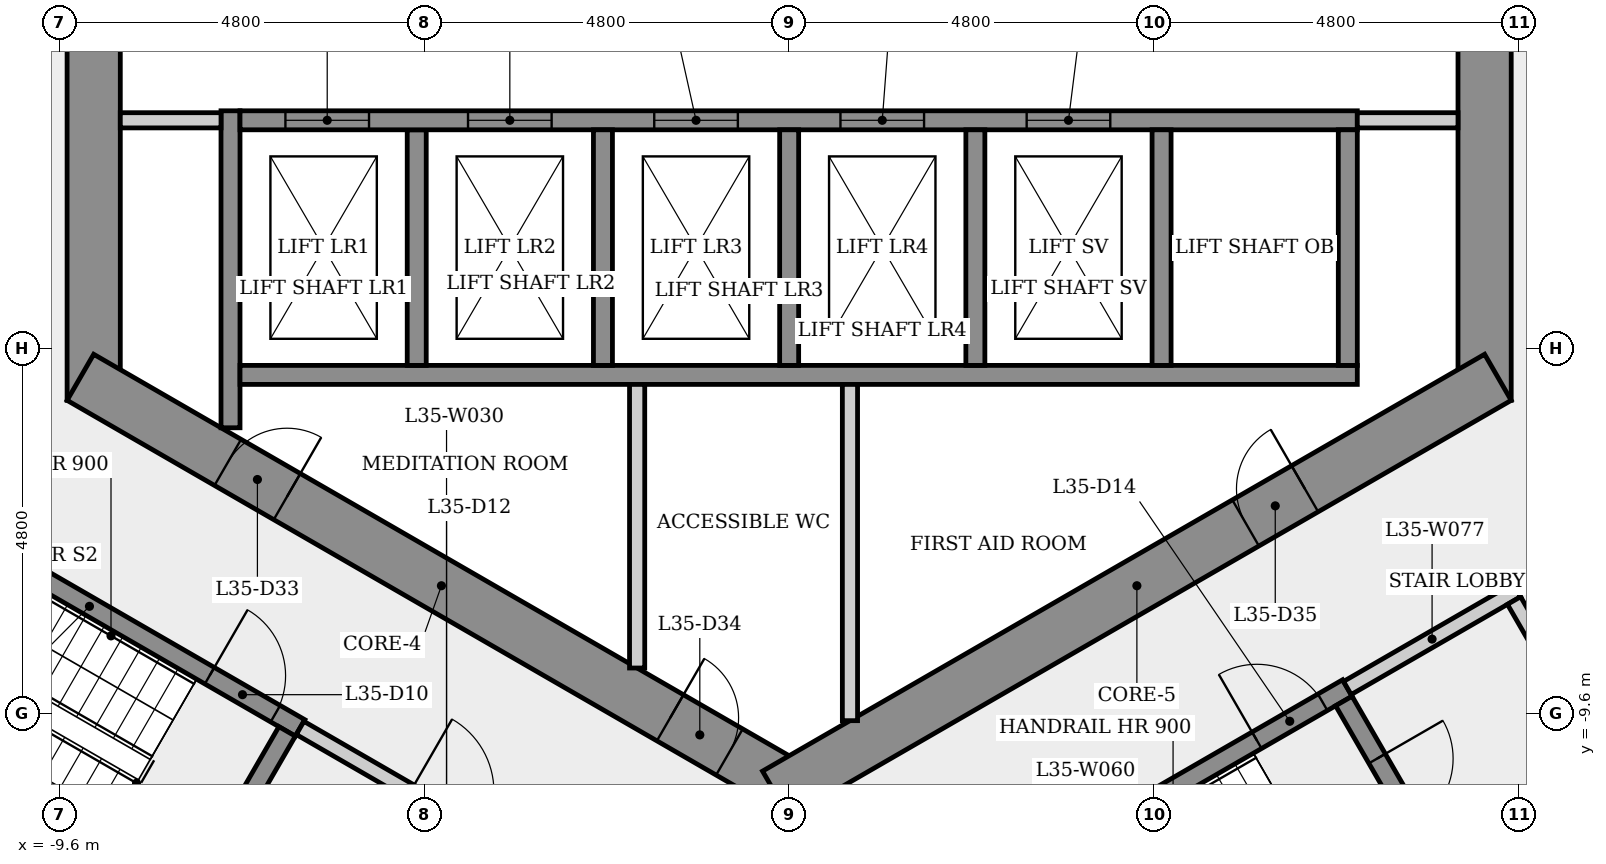
"""IFC4 building model, lengths in metres.
Left out: names, types, materials, properties, quantities, classifications, styles, units other than length and angle.
Written with IfcOpenShell. Run it as: python <this file> out.ifc"""

import sys

from ifc_helpers import new_model, si_unit, direction, frame, frame_2d, origin, place, context, subcontext, project, spatial, rectangle, extrude, element, fill, save


model = new_model("IFC4")
c1 = context("Model", 3, precision=1e-05, world=origin(), true_north=direction((0.0, 1.0)))
c2 = subcontext(c1, "Body", "Model", "MODEL_VIEW")
j1 = project(units=[si_unit("LENGTHUNIT", "METRE"), si_unit("PLANEANGLEUNIT", "RADIAN")], contexts=[c1])
p1 = place(None, origin())
s1 = spatial("IfcSite", under=j1, at=p1, CompositionType="ELEMENT")
p2 = place(p1, origin())
s2 = spatial("IfcBuilding", under=s1, at=p2, CompositionType="ELEMENT")
p3 = place(p2, frame((0.0, 0.0, 132.5)))
s3 = spatial("IfcBuildingStorey", under=s2, at=p3, CompositionType="ELEMENT", Elevation=132.5)
p4 = place(p3, frame((9.15, -5.485, 0.0), z_axis=(0.0, 0.0, 1.0), x_axis=(0.0, 1.0, 0.0)))
e1 = element("IfcWall", 1, at=p4, inside=s3, PredefinedType="SHEAR", context=c2, shape_type="SweptSolid", body=[
    extrude(rectangle(XDim=10.97, YDim=0.7, at=frame_2d((5.485, 0.0))), origin(), (0.0, 0.0, 1.0), 3.4),
])
p5 = place(p4, frame((4.685, 0.0, 0.0)))
e2 = element("IfcOpeningElement", 2, at=p5, cuts=e1, PredefinedType="OPENING", context=c2, shape_type="SweptSolid", body=[
    extrude(rectangle(XDim=1.6, YDim=2.1, at=frame_2d((0.8, 1.05))), frame((0.0, 0.36, 0.0), z_axis=(0.0, -1.0, 0.0), x_axis=(1.0, 0.0, 0.0)), (0.0, 0.0, 1.0), 0.72),
])
p6 = place(p3, frame((-9.15, 5.485, 0.0), z_axis=(0.0, 0.0, 1.0), x_axis=(0.0, -1.0, 0.0)))
e3 = element("IfcWall", 3, at=p6, inside=s3, PredefinedType="SHEAR", context=c2, shape_type="SweptSolid", body=[
    extrude(rectangle(XDim=10.97, YDim=0.7, at=frame_2d((5.485, 0.0))), origin(), (0.0, 0.0, 1.0), 3.4),
])
p7 = place(p6, frame((4.685, 0.0, 0.0)))
e4 = element("IfcOpeningElement", 4, at=p7, cuts=e3, PredefinedType="OPENING", context=c2, shape_type="SweptSolid", body=[
    extrude(rectangle(XDim=1.6, YDim=2.1, at=frame_2d((0.8, 1.05))), frame((0.0, 0.36, 0.0), z_axis=(0.0, -1.0, 0.0), x_axis=(1.0, 0.0, 0.0)), (0.0, 0.0, 1.0), 0.72),
])
p8 = place(p3, frame((-9.325, -5.182, 0.0), z_axis=(0.0, 0.0, 1.0), x_axis=(0.866023993627, -0.500002442456, 0.0)))
e5 = element("IfcWall", 5, at=p8, inside=s3, PredefinedType="SHEAR", context=c2, shape_type="SweptSolid", body=[
    extrude(rectangle(XDim=10.97, YDim=0.7, at=frame_2d((5.485, 0.0))), origin(), (0.0, 0.0, 1.0), 3.4),
])
p9 = place(p8, frame((2.239, 0.0, 0.0)))
e6 = element("IfcOpeningElement", 6, at=p9, cuts=e5, PredefinedType="OPENING", context=c2, shape_type="SweptSolid", body=[
    extrude(rectangle(XDim=0.9, YDim=2.1, at=frame_2d((0.45, 1.05))), frame((0.0, 0.36, 0.0), z_axis=(0.0, -1.0, 0.0), x_axis=(1.0, 0.0, 0.0)), (0.0, 0.0, 1.0), 0.72),
])
p10 = place(p8, frame((8.96, 0.0, 0.0)))
e7 = element("IfcOpeningElement", 7, at=p10, cuts=e5, PredefinedType="OPENING", context=c2, shape_type="SweptSolid", body=[
    extrude(rectangle(XDim=0.9, YDim=2.1, at=frame_2d((0.45, 1.05))), frame((0.0, 0.36, 0.0), z_axis=(0.0, -1.0, 0.0), x_axis=(1.0, 0.0, 0.0)), (0.0, 0.0, 1.0), 0.72),
])
p11 = place(p3, frame((-0.175, -10.667, 0.0), z_axis=(0.0, 0.0, 1.0), x_axis=(0.866023993627, 0.500002442456, 0.0)))
e8 = element("IfcWall", 8, at=p11, inside=s3, PredefinedType="SHEAR", context=c2, shape_type="SweptSolid", body=[
    extrude(rectangle(XDim=10.97, YDim=0.7, at=frame_2d((5.485, 0.0))), origin(), (0.0, 0.0, 1.0), 3.4),
])
p12 = place(p11, frame((7.137, 0.0, 0.0)))
e9 = element("IfcOpeningElement", 9, at=p12, cuts=e8, PredefinedType="OPENING", context=c2, shape_type="SweptSolid", body=[
    extrude(rectangle(XDim=0.9, YDim=2.1, at=frame_2d((0.45, 1.05))), frame((0.0, 0.36, 0.0), z_axis=(0.0, -1.0, 0.0), x_axis=(1.0, 0.0, 0.0)), (0.0, 0.0, 1.0), 0.72),
])
p13 = place(p3, frame((-11.977, -6.595, 0.0), z_axis=(0.0, 0.0, 1.0), x_axis=(0.866025499775, -0.499999833739, 0.0)))
e10 = element("IfcWall", 10, at=p13, inside=s3, PredefinedType="SHEAR", context=c2, shape_type="SweptSolid", body=[
    extrude(rectangle(XDim=6.4, YDim=0.25, at=frame_2d((3.2, 0.0))), origin(), (0.0, 0.0, 1.0), 3.0),
])
p14 = place(p13, frame((5.025, 0.0, 0.0)))
e11 = element("IfcOpeningElement", 11, at=p14, cuts=e10, PredefinedType="OPENING", context=c2, shape_type="SweptSolid", body=[
    extrude(rectangle(XDim=1.0, YDim=2.1, at=frame_2d((0.5, 1.05))), frame((0.0, 0.135, 0.0), z_axis=(0.0, -1.0, 0.0), x_axis=(1.0, 0.0, 0.0)), (0.0, 0.0, 1.0), 0.27),
])
p15 = place(p3, frame((-13.477, -9.193, 0.0), z_axis=(0.0, 0.0, 1.0), x_axis=(0.866025499775, -0.499999833739, 0.0)))
e12 = element("IfcWall", 12, at=p15, inside=s3, PredefinedType="SHEAR", context=c2, shape_type="SweptSolid", body=[
    extrude(rectangle(XDim=6.4, YDim=0.25, at=frame_2d((3.2, 0.0))), origin(), (0.0, 0.0, 1.0), 3.0),
])
p16 = place(p3, frame((-7.35, -5.846, 0.0), z_axis=(0.0, 0.0, 1.0), x_axis=(0.0, 1.0, 0.0)))
e13 = element("IfcWall", 13, at=p16, inside=s3, PredefinedType="SHEAR", context=c2, shape_type="SweptSolid", body=[
    extrude(rectangle(XDim=4.171, YDim=0.25, at=frame_2d((2.085, 0.0))), origin(), (0.0, 0.0, 1.0), 3.0),
])
p17 = place(p3, frame((-7.475, -1.8, 0.0), z_axis=(0.0, 0.0, 1.0), x_axis=(-1.0, 0.0, 0.0)))
e14 = element("IfcWall", 14, at=p17, inside=s3, PredefinedType="PARTITIONING", context=c2, shape_type="SweptSolid", body=[
    extrude(rectangle(XDim=1.325, YDim=0.2, at=frame_2d((0.663, 0.0))), origin(), (0.0, 0.0, 1.0), 3.0),
])
p18 = place(p3, frame((-6.605, -9.841, 0.0), z_axis=(0.0, 0.0, 1.0), x_axis=(-0.499996545922, -0.866027397988, 0.0)))
e15 = element("IfcWall", 15, at=p18, inside=s3, PredefinedType="SHEAR", context=c2, shape_type="SweptSolid", body=[
    extrude(rectangle(XDim=2.75, YDim=0.25, at=frame_2d((1.375, 0.0))), origin(), (0.0, 0.0, 1.0), 3.0),
])
p19 = place(p18, frame((0.875, 0.0, 0.0)))
e16 = element("IfcOpeningElement", 16, at=p19, cuts=e15, PredefinedType="OPENING", context=c2, shape_type="SweptSolid", body=[
    extrude(rectangle(XDim=1.0, YDim=2.1, at=frame_2d((0.5, 1.05))), frame((0.0, 0.135, 0.0), z_axis=(0.0, -1.0, 0.0), x_axis=(1.0, 0.0, 0.0)), (0.0, 0.0, 1.0), 0.27),
])
p20 = place(p3, frame((-6.435, -9.795, 0.0), z_axis=(0.0, 0.0, 1.0), x_axis=(0.866012907634, -0.500021643343, 0.0)))
e17 = element("IfcWall", 17, at=p20, inside=s3, PredefinedType="PARTITIONING", context=c2, shape_type="SweptSolid", body=[
    extrude(rectangle(XDim=4.45, YDim=0.2, at=frame_2d((2.225, 0.0))), origin(), (0.0, 0.0, 1.0), 3.0),
])
p21 = place(p20, frame((1.675, 0.0, 0.0)))
e18 = element("IfcOpeningElement", 18, at=p21, cuts=e17, PredefinedType="OPENING", context=c2, shape_type="SweptSolid", body=[
    extrude(rectangle(XDim=1.1, YDim=2.1, at=frame_2d((0.55, 1.05))), frame((0.0, 0.11, 0.0), z_axis=(0.0, -1.0, 0.0), x_axis=(1.0, 0.0, 0.0)), (0.0, 0.0, 1.0), 0.22),
])
p22 = place(p3, frame((-7.225, -5.15, 0.0), z_axis=(0.0, 0.0, 1.0), x_axis=(1.0, 0.0, 0.0)))
e19 = element("IfcWall", 19, at=p22, inside=s3, PredefinedType="SHEAR", context=c2, shape_type="SweptSolid", body=[
    extrude(rectangle(XDim=14.7, YDim=0.25, at=frame_2d((7.35, 0.0))), origin(), (0.0, 0.0, 1.0), 3.0),
])
p23 = place(p3, frame((-4.9, -1.925, 0.0), z_axis=(0.0, 0.0, 1.0), x_axis=(0.0, -1.0, 0.0)))
e20 = element("IfcWall", 20, at=p23, inside=s3, PredefinedType="SHEAR", context=c2, shape_type="SweptSolid", body=[
    extrude(rectangle(XDim=3.1, YDim=0.25, at=frame_2d((1.55, 0.0))), origin(), (0.0, 0.0, 1.0), 3.4),
])
p24 = place(p3, frame((-7.225, -1.8, 0.0), z_axis=(0.0, 0.0, 1.0), x_axis=(1.0, 0.0, 0.0)))
e21 = element("IfcWall", 21, at=p24, inside=s3, PredefinedType="SHEAR", context=c2, shape_type="SweptSolid", body=[
    extrude(rectangle(XDim=14.7, YDim=0.25, at=frame_2d((7.35, 0.0))), origin(), (0.0, 0.0, 1.0), 3.0),
])
p25 = place(p24, frame((0.597, 0.0, 0.0)))
e22 = element("IfcOpeningElement", 22, at=p25, cuts=e21, PredefinedType="OPENING", context=c2, shape_type="SweptSolid", body=[
    extrude(rectangle(XDim=1.1, YDim=2.1, at=frame_2d((0.55, 1.05))), frame((0.0, 0.135, 0.0), z_axis=(0.0, -1.0, 0.0), x_axis=(1.0, 0.0, 0.0)), (0.0, 0.0, 1.0), 0.27),
])
p26 = place(p24, frame((3.0, 0.0, 0.0)))
e23 = element("IfcOpeningElement", 23, at=p26, cuts=e21, PredefinedType="OPENING", context=c2, shape_type="SweptSolid", body=[
    extrude(rectangle(XDim=1.1, YDim=2.1, at=frame_2d((0.55, 1.05))), frame((0.0, 0.135, 0.0), z_axis=(0.0, -1.0, 0.0), x_axis=(1.0, 0.0, 0.0)), (0.0, 0.0, 1.0), 0.27),
])
p27 = place(p24, frame((5.45, 0.0, 0.0)))
e24 = element("IfcOpeningElement", 24, at=p27, cuts=e21, PredefinedType="OPENING", context=c2, shape_type="SweptSolid", body=[
    extrude(rectangle(XDim=1.1, YDim=2.1, at=frame_2d((0.55, 1.05))), frame((0.0, 0.135, 0.0), z_axis=(0.0, -1.0, 0.0), x_axis=(1.0, 0.0, 0.0)), (0.0, 0.0, 1.0), 0.27),
])
p28 = place(p24, frame((7.9, 0.0, 0.0)))
e25 = element("IfcOpeningElement", 25, at=p28, cuts=e21, PredefinedType="OPENING", context=c2, shape_type="SweptSolid", body=[
    extrude(rectangle(XDim=1.1, YDim=2.1, at=frame_2d((0.55, 1.05))), frame((0.0, 0.135, 0.0), z_axis=(0.0, -1.0, 0.0), x_axis=(1.0, 0.0, 0.0)), (0.0, 0.0, 1.0), 0.27),
])
p29 = place(p24, frame((10.35, 0.0, 0.0)))
e26 = element("IfcOpeningElement", 26, at=p29, cuts=e21, PredefinedType="OPENING", context=c2, shape_type="SweptSolid", body=[
    extrude(rectangle(XDim=1.1, YDim=2.1, at=frame_2d((0.55, 1.05))), frame((0.0, 0.135, 0.0), z_axis=(0.0, -1.0, 0.0), x_axis=(1.0, 0.0, 0.0)), (0.0, 0.0, 1.0), 0.27),
])
p30 = place(p3, frame((-2.45, -1.925, 0.0), z_axis=(0.0, 0.0, 1.0), x_axis=(0.0, -1.0, 0.0)))
e27 = element("IfcWall", 27, at=p30, inside=s3, PredefinedType="SHEAR", context=c2, shape_type="SweptSolid", body=[
    extrude(rectangle(XDim=3.1, YDim=0.25, at=frame_2d((1.55, 0.0))), origin(), (0.0, 0.0, 1.0), 3.4),
])
p31 = place(p3, frame((-2.0, -5.275, 0.0), z_axis=(0.0, 0.0, 1.0), x_axis=(0.0, -1.0, 0.0)))
e28 = element("IfcWall", 28, at=p31, inside=s3, PredefinedType="PARTITIONING", context=c2, shape_type="SweptSolid", body=[
    extrude(rectangle(XDim=3.732, YDim=0.2, at=frame_2d((1.866, 0.0))), origin(), (0.0, 0.0, 1.0), 3.0),
])
p32 = place(p3, frame((0.0, -1.925, 0.0), z_axis=(0.0, 0.0, 1.0), x_axis=(0.0, -1.0, 0.0)))
e29 = element("IfcWall", 29, at=p32, inside=s3, PredefinedType="SHEAR", context=c2, shape_type="SweptSolid", body=[
    extrude(rectangle(XDim=3.1, YDim=0.25, at=frame_2d((1.55, 0.0))), origin(), (0.0, 0.0, 1.0), 3.4),
])
p33 = place(p3, frame((0.8, -5.275, 0.0), z_axis=(0.0, 0.0, 1.0), x_axis=(0.0, -1.0, 0.0)))
e30 = element("IfcWall", 30, at=p33, inside=s3, PredefinedType="PARTITIONING", context=c2, shape_type="SweptSolid", body=[
    extrude(rectangle(XDim=4.425, YDim=0.2, at=frame_2d((2.212, 0.0))), origin(), (0.0, 0.0, 1.0), 3.0),
])
p34 = place(p3, frame((1.585, -12.595, 0.0), z_axis=(0.0, 0.0, 1.0), x_axis=(0.866036417653, 0.499980922934, 0.0)))
e31 = element("IfcWall", 31, at=p34, inside=s3, PredefinedType="SHEAR", context=c2, shape_type="SweptSolid", body=[
    extrude(rectangle(XDim=6.65, YDim=0.25, at=frame_2d((3.325, 0.0))), origin(), (0.0, 0.0, 1.0), 3.0),
])
p35 = place(p34, frame((5.275, 0.0, 0.0)))
e32 = element("IfcOpeningElement", 32, at=p35, cuts=e31, PredefinedType="OPENING", context=c2, shape_type="SweptSolid", body=[
    extrude(rectangle(XDim=1.0, YDim=2.1, at=frame_2d((0.5, 1.05))), frame((0.0, 0.135, 0.0), z_axis=(0.0, -1.0, 0.0), x_axis=(1.0, 0.0, 0.0)), (0.0, 0.0, 1.0), 0.27),
])
for number, where, z_axis, x_axis in (
    (33, (2.45, -1.925, 0.0), (0.0, 0.0, 1.0), (0.0, -1.0, 0.0)),
    (34, (4.9, -1.925, 0.0), (0.0, 0.0, 1.0), (0.0, -1.0, 0.0)),
):
    element("IfcWall", number, at=place(p3, frame(where, z_axis=z_axis, x_axis=x_axis)), inside=s3, PredefinedType="SHEAR", context=c2, shape_type="SweptSolid", body=[
        extrude(rectangle(XDim=3.1, YDim=0.25, at=frame_2d((1.55, 0.0))), origin(), (0.0, 0.0, 1.0), 3.4),
    ])
p36 = place(p3, frame((7.298, -9.441, 0.0), z_axis=(0.0, 0.0, 1.0), x_axis=(0.500034990121, -0.866005201286, 0.0)))
e35 = element("IfcWall", 35, at=p36, inside=s3, PredefinedType="SHEAR", context=c2, shape_type="SweptSolid", body=[
    extrude(rectangle(XDim=2.75, YDim=0.25, at=frame_2d((1.375, 0.0))), origin(), (0.0, 0.0, 1.0), 3.0),
])
p37 = place(p36, frame((0.875, 0.0, 0.0)))
e36 = element("IfcOpeningElement", 36, at=p37, cuts=e35, PredefinedType="OPENING", context=c2, shape_type="SweptSolid", body=[
    extrude(rectangle(XDim=1.0, YDim=2.1, at=frame_2d((0.5, 1.05))), frame((0.0, 0.135, 0.0), z_axis=(0.0, -1.0, 0.0), x_axis=(1.0, 0.0, 0.0)), (0.0, 0.0, 1.0), 0.27),
])
p38 = place(p3, frame((7.344, -9.27, 0.0), z_axis=(0.0, 0.0, 1.0), x_axis=(0.866005588531, 0.500034319456, 0.0)))
e37 = element("IfcWall", 37, at=p38, inside=s3, PredefinedType="PARTITIONING", context=c2, shape_type="SweptSolid", body=[
    extrude(rectangle(XDim=2.575, YDim=0.2, at=frame_2d((1.288, 0.0))), origin(), (0.0, 0.0, 1.0), 3.0),
])
p39 = place(p3, frame((7.35, -1.925, 0.0), z_axis=(0.0, 0.0, 1.0), x_axis=(0.0, -1.0, 0.0)))
e38 = element("IfcWall", 38, at=p39, inside=s3, PredefinedType="SHEAR", context=c2, shape_type="SweptSolid", body=[
    extrude(rectangle(XDim=3.1, YDim=0.25, at=frame_2d((1.55, 0.0))), origin(), (0.0, 0.0, 1.0), 3.4),
])
p40 = place(p3, frame((8.8, -1.8, 0.0), z_axis=(0.0, 0.0, 1.0), x_axis=(-1.0, 0.0, 0.0)))
e39 = element("IfcWall", 39, at=p40, inside=s3, PredefinedType="PARTITIONING", context=c2, shape_type="SweptSolid", body=[
    extrude(rectangle(XDim=1.325, YDim=0.2, at=frame_2d((0.663, 0.0))), origin(), (0.0, 0.0, 1.0), 3.0),
])
p41 = place(p3, frame((9.537, -8.119, 0.0), z_axis=(0.0, 0.0, 1.0), x_axis=(0.499990139034, -0.866031096941, 0.0)))
e40 = element("IfcWall", 40, at=p41, inside=s3, PredefinedType="PARTITIONING", context=c2, shape_type="SweptSolid", body=[
    extrude(rectangle(XDim=3.0, YDim=0.2, at=frame_2d((1.5, 0.0))), origin(), (0.0, 0.0, 1.0), 3.0),
])
p42 = place(p41, frame((0.935, 0.0, 0.0)))
e41 = element("IfcOpeningElement", 41, at=p42, cuts=e40, PredefinedType="OPENING", context=c2, shape_type="SweptSolid", body=[
    extrude(rectangle(XDim=1.0, YDim=2.1, at=frame_2d((0.5, 1.05))), frame((0.0, 0.11, 0.0), z_axis=(0.0, -1.0, 0.0), x_axis=(1.0, 0.0, 0.0)), (0.0, 0.0, 1.0), 0.22),
])
p43 = place(p25, origin())
e42 = element("IfcDoor", 42, at=p43, inside=s3, OperationType="SLIDING_TO_LEFT", PredefinedType="DOOR", context=c2, shape_type="SweptSolid", body=[
    extrude(rectangle(XDim=1.1, YDim=2.1, at=frame_2d((0.55, 1.05))), frame((0.0, 0.025, 0.0), z_axis=(0.0, -1.0, 0.0), x_axis=(1.0, 0.0, 0.0)), (0.0, 0.0, 1.0), 0.05),
])
fill(e22, e42)
p44 = place(p26, origin())
e43 = element("IfcDoor", 43, at=p44, inside=s3, OperationType="SLIDING_TO_LEFT", PredefinedType="DOOR", context=c2, shape_type="SweptSolid", body=[
    extrude(rectangle(XDim=1.1, YDim=2.1, at=frame_2d((0.55, 1.05))), frame((0.0, 0.025, 0.0), z_axis=(0.0, -1.0, 0.0), x_axis=(1.0, 0.0, 0.0)), (0.0, 0.0, 1.0), 0.05),
])
fill(e23, e43)
p45 = place(p27, origin())
e44 = element("IfcDoor", 44, at=p45, inside=s3, OperationType="SLIDING_TO_LEFT", PredefinedType="DOOR", context=c2, shape_type="SweptSolid", body=[
    extrude(rectangle(XDim=1.1, YDim=2.1, at=frame_2d((0.55, 1.05))), frame((0.0, 0.025, 0.0), z_axis=(0.0, -1.0, 0.0), x_axis=(1.0, 0.0, 0.0)), (0.0, 0.0, 1.0), 0.05),
])
fill(e24, e44)
p46 = place(p28, origin())
e45 = element("IfcDoor", 45, at=p46, inside=s3, OperationType="SLIDING_TO_LEFT", PredefinedType="DOOR", context=c2, shape_type="SweptSolid", body=[
    extrude(rectangle(XDim=1.1, YDim=2.1, at=frame_2d((0.55, 1.05))), frame((0.0, 0.025, 0.0), z_axis=(0.0, -1.0, 0.0), x_axis=(1.0, 0.0, 0.0)), (0.0, 0.0, 1.0), 0.05),
])
fill(e25, e45)
p47 = place(p29, origin())
e46 = element("IfcDoor", 46, at=p47, inside=s3, OperationType="SLIDING_TO_LEFT", PredefinedType="DOOR", context=c2, shape_type="SweptSolid", body=[
    extrude(rectangle(XDim=1.1, YDim=2.1, at=frame_2d((0.55, 1.05))), frame((0.0, 0.025, 0.0), z_axis=(0.0, -1.0, 0.0), x_axis=(1.0, 0.0, 0.0)), (0.0, 0.0, 1.0), 0.05),
])
fill(e26, e46)
p48 = place(p14, origin())
e47 = element("IfcDoor", 47, at=p48, inside=s3, OperationType="SINGLE_SWING_LEFT", PredefinedType="DOOR", context=c2, shape_type="SweptSolid", body=[
    extrude(rectangle(XDim=1.0, YDim=2.1, at=frame_2d((0.5, 1.05))), frame((0.0, 0.025, 0.0), z_axis=(0.0, -1.0, 0.0), x_axis=(1.0, 0.0, 0.0)), (0.0, 0.0, 1.0), 0.05),
])
fill(e11, e47)
p49 = place(p35, origin())
e48 = element("IfcDoor", 48, at=p49, inside=s3, OperationType="SINGLE_SWING_LEFT", PredefinedType="DOOR", context=c2, shape_type="SweptSolid", body=[
    extrude(rectangle(XDim=1.0, YDim=2.1, at=frame_2d((0.5, 1.05))), frame((0.0, 0.025, 0.0), z_axis=(0.0, -1.0, 0.0), x_axis=(1.0, 0.0, 0.0)), (0.0, 0.0, 1.0), 0.05),
])
fill(e32, e48)
p50 = place(p37, origin())
e49 = element("IfcDoor", 49, at=p50, inside=s3, OperationType="SINGLE_SWING_LEFT", PredefinedType="DOOR", context=c2, shape_type="SweptSolid", body=[
    extrude(rectangle(XDim=1.0, YDim=2.1, at=frame_2d((0.5, 1.05))), frame((0.0, 0.025, 0.0), z_axis=(0.0, -1.0, 0.0), x_axis=(1.0, 0.0, 0.0)), (0.0, 0.0, 1.0), 0.05),
])
fill(e36, e49)
p51 = place(p9, origin())
e50 = element("IfcDoor", 50, at=p51, inside=s3, OperationType="SINGLE_SWING_RIGHT", PredefinedType="DOOR", context=c2, shape_type="SweptSolid", body=[
    extrude(rectangle(XDim=0.9, YDim=2.1, at=frame_2d((0.45, 1.05))), frame((0.0, 0.025, 0.0), z_axis=(0.0, -1.0, 0.0), x_axis=(1.0, 0.0, 0.0)), (0.0, 0.0, 1.0), 0.05),
])
fill(e6, e50)
p52 = place(p10, origin())
e51 = element("IfcDoor", 51, at=p52, inside=s3, OperationType="SINGLE_SWING_LEFT", PredefinedType="DOOR", context=c2, shape_type="SweptSolid", body=[
    extrude(rectangle(XDim=0.9, YDim=2.1, at=frame_2d((0.45, 1.05))), frame((0.0, 0.025, 0.0), z_axis=(0.0, -1.0, 0.0), x_axis=(1.0, 0.0, 0.0)), (0.0, 0.0, 1.0), 0.05),
])
fill(e7, e51)
p53 = place(p12, origin())
e52 = element("IfcDoor", 52, at=p53, inside=s3, OperationType="SINGLE_SWING_RIGHT", PredefinedType="DOOR", context=c2, shape_type="SweptSolid", body=[
    extrude(rectangle(XDim=0.9, YDim=2.1, at=frame_2d((0.45, 1.05))), frame((0.0, 0.025, 0.0), z_axis=(0.0, -1.0, 0.0), x_axis=(1.0, 0.0, 0.0)), (0.0, 0.0, 1.0), 0.05),
])
fill(e9, e52)
save(model, sys.argv[1])
